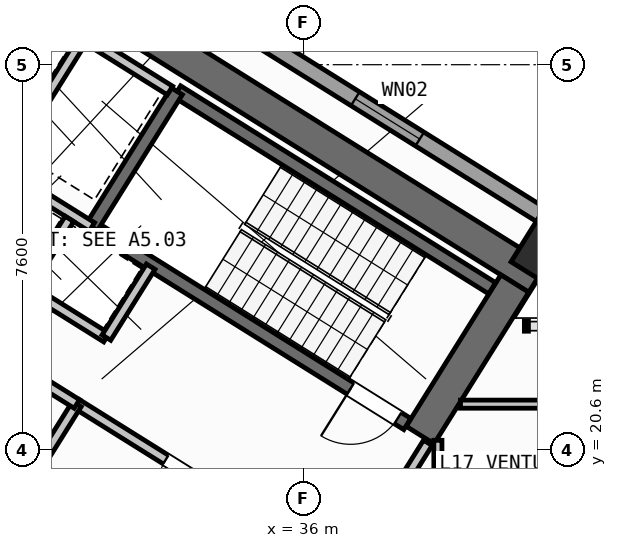
"""IFC4 building model, lengths in metres.
Left out: names, types, materials, properties, quantities, classifications, styles, units other than length and angle.
Written with IfcOpenShell. Run it as: python <this file> out.ifc"""

import sys

from ifc_helpers import new_model, si_unit, direction, frame, frame_2d, origin, origin_2d, place, context, subcontext, project, spatial, rectangle, hollow_rectangle, extrude, source, transform, mapped, element, fill, save


model = new_model("IFC4")
c1 = context("Model", 3, precision=1e-05, world=origin(), true_north=direction((0.0, 1.0)))
c2 = subcontext(c1, "Body", "Model", "MODEL_VIEW")
j1 = project(units=[si_unit("LENGTHUNIT", "METRE"), si_unit("PLANEANGLEUNIT", "RADIAN")], contexts=[c1])
p1 = place(None, origin())
s1 = spatial("IfcSite", under=j1, at=p1, CompositionType="ELEMENT")
p2 = place(p1, origin())
s2 = spatial("IfcBuilding", under=s1, at=p2, CompositionType="ELEMENT")
p3 = place(p2, frame((0.0, 0.0, 67.2)))
s3 = spatial("IfcBuildingStorey", under=s2, at=p3, CompositionType="ELEMENT", Elevation=67.2)
p4 = place(p3, frame((40.615, 23.983, 0.0), z_axis=(0.0, 0.0, 1.0), x_axis=(-0.848045953968, 0.529922692436, 0.0)))
e1 = element("IfcWall", 1, at=p4, inside=s3, PredefinedType="SHEAR", context=c2, shape_type="SweptSolid", body=[
    extrude(rectangle(XDim=13.24, YDim=0.65, at=frame_2d((6.62, 0.0))), origin(), (0.0, 0.0, 1.0), 4.22),
])
p5 = place(p3, frame((40.168, 23.88, 0.0), z_axis=(0.0, 0.0, 1.0), x_axis=(-0.529893103397, -0.8480644427, 0.0)))
e2 = element("IfcWall", 2, at=p5, inside=s3, PredefinedType="SHEAR", context=c2, shape_type="SweptSolid", body=[
    extrude(rectangle(XDim=3.525, YDim=0.65, at=frame_2d((1.763, 0.0))), origin(), (0.0, 0.0, 1.0), 4.22),
])
m1 = source(origin(), c2, "Body", "SweptSolid", [
    extrude(hollow_rectangle(XDim=1.0, YDim=1.0, WallThickness=0.04, at=origin_2d()), origin(), (0.0, 0.0, 1.0), 4.5),
])
p6 = place(p3, frame((40.783, 24.469, 0.0), z_axis=(0.0, 0.0, 1.0), x_axis=(-0.848048096156, 0.529919264233, 0.0)))
e3 = element("IfcColumn", 3, at=p6, inside=s3, PredefinedType="COLUMN", context=c2, shape_type="MappedRepresentation", body=[
    mapped(m1, transform((0.0, 0.0, 0.0), scale=1.0)),
])
p7 = place(p3, frame((14.138, 41.825, 0.0), z_axis=(0.0, 0.0, 1.0), x_axis=(0.848046498049, -0.529921821731, 0.0)))
e4 = element("IfcWall", 4, at=p7, inside=s3, PredefinedType="STANDARD", context=c2, shape_type="SweptSolid", body=[
    extrude(rectangle(XDim=31.588, YDim=0.32, at=frame_2d((15.794, 0.0))), origin(), (0.0, 0.0, 1.0), 4.22),
])
p8 = place(p7, frame((2.526, 0.0, 0.0)))
e5 = element("IfcOpeningElement", 5, at=p8, cuts=e4, PredefinedType="OPENING", context=c2, shape_type="SweptSolid", body=[
    extrude(rectangle(XDim=1.05, YDim=2.15, at=frame_2d((0.525, 1.075))), frame((0.0, 0.17, 0.0), z_axis=(0.0, -1.0, 0.0), x_axis=(1.0, 0.0, 0.0)), (0.0, 0.0, 1.0), 0.34),
])
p9 = place(p7, frame((9.364, 0.0, 0.95)))
e6 = element("IfcOpeningElement", 6, at=p9, cuts=e4, PredefinedType="OPENING", context=c2, shape_type="SweptSolid", body=[
    extrude(rectangle(XDim=1.2, YDim=1.4, at=frame_2d((0.6, 0.7))), frame((0.0, 0.17, 0.0), z_axis=(0.0, -1.0, 0.0), x_axis=(1.0, 0.0, 0.0)), (0.0, 0.0, 1.0), 0.34),
])
p10 = place(p7, frame((14.636, 0.0, 1.0)))
e7 = element("IfcOpeningElement", 7, at=p10, cuts=e4, PredefinedType="OPENING", context=c2, shape_type="SweptSolid", body=[
    extrude(rectangle(XDim=0.9, YDim=1.25, at=frame_2d((0.45, 0.625))), frame((0.0, 0.17, 0.0), z_axis=(0.0, -1.0, 0.0), x_axis=(1.0, 0.0, 0.0)), (0.0, 0.0, 1.0), 0.34),
])
p11 = place(p7, frame((22.306, 0.0, 0.85)))
e8 = element("IfcOpeningElement", 8, at=p11, cuts=e4, PredefinedType="OPENING", context=c2, shape_type="SweptSolid", body=[
    extrude(rectangle(XDim=1.5, YDim=1.5, at=frame_2d((0.75, 0.75))), frame((0.0, 0.17, 0.0), z_axis=(0.0, -1.0, 0.0), x_axis=(1.0, 0.0, 0.0)), (0.0, 0.0, 1.0), 0.34),
])
p12 = place(p7, frame((26.981, 0.0, 0.85)))
e9 = element("IfcOpeningElement", 9, at=p12, cuts=e4, PredefinedType="OPENING", context=c2, shape_type="SweptSolid", body=[
    extrude(rectangle(XDim=1.5, YDim=1.5, at=frame_2d((0.75, 0.75))), frame((0.0, 0.17, 0.0), z_axis=(0.0, -1.0, 0.0), x_axis=(1.0, 0.0, 0.0)), (0.0, 0.0, 1.0), 0.34),
])
p13 = place(p3, frame((31.28, 18.261, 0.0), z_axis=(0.0, 0.0, 1.0), x_axis=(-0.848051618787, 0.529913626805, 0.0)))
e10 = element("IfcWall", 10, at=p13, inside=s3, PredefinedType="SHEAR", context=c2, shape_type="SweptSolid", body=[
    extrude(rectangle(XDim=7.46, YDim=0.26, at=frame_2d((3.73, 0.0))), origin(), (0.0, 0.0, 1.0), 4.22),
])
p14 = place(p13, frame((0.36, 0.0, 0.0)))
e11 = element("IfcOpeningElement", 11, at=p14, cuts=e10, PredefinedType="OPENING", context=c2, shape_type="SweptSolid", body=[
    extrude(rectangle(XDim=0.86, YDim=2.05, at=frame_2d((0.43, 1.025))), frame((0.0, 0.14, 0.0), z_axis=(0.0, -1.0, 0.0), x_axis=(1.0, 0.0, 0.0)), (0.0, 0.0, 1.0), 0.28),
])
p15 = place(p3, frame((39.721, 23.788, 0.0), z_axis=(0.0, 0.0, 1.0), x_axis=(-0.848054434086, 0.529909121291, 0.0)))
e12 = element("IfcWall", 12, at=p15, inside=s3, PredefinedType="SHEAR", context=c2, shape_type="SweptSolid", body=[
    extrude(rectangle(XDim=7.33, YDim=0.26, at=frame_2d((3.665, 0.0))), origin(), (0.0, 0.0, 1.0), 4.22),
])
p16 = place(p3, frame((38.046, 21.108, 0.0), z_axis=(0.0, 0.0, 1.0), x_axis=(-0.848054434086, 0.529909121291, 0.0)))
e13 = element("IfcWall", 13, at=p16, inside=s3, PredefinedType="SHEAR", context=c2, shape_type="SweptSolid", body=[
    extrude(rectangle(XDim=7.33, YDim=0.26, at=frame_2d((3.665, 0.0))), origin(), (0.0, 0.0, 1.0), 4.22),
])
p17 = place(p16, frame((0.22, 0.0, 0.0)))
e14 = element("IfcOpeningElement", 14, at=p17, cuts=e13, PredefinedType="OPENING", context=c2, shape_type="SweptSolid", body=[
    extrude(rectangle(XDim=1.1, YDim=2.1, at=frame_2d((0.55, 1.05))), frame((0.0, 0.14, 0.0), z_axis=(0.0, -1.0, 0.0), x_axis=(1.0, 0.0, 0.0)), (0.0, 0.0, 1.0), 0.28),
])
p18 = place(p3, frame((33.496, 27.677, 0.0), z_axis=(0.0, 0.0, 1.0), x_axis=(-0.529908658664, -0.84805472316, 0.0)))
e15 = element("IfcWall", 15, at=p18, inside=s3, PredefinedType="SHEAR", context=c2, shape_type="SweptSolid", body=[
    extrude(rectangle(XDim=3.16, YDim=0.26, at=frame_2d((1.58, 0.0))), origin(), (0.0, 0.0, 1.0), 4.22),
])
p19 = place(p3, frame((36.374, 18.474, 0.0), z_axis=(0.0, 0.0, 1.0), x_axis=(-0.848051071577, 0.529914502535, 0.0)))
e16 = element("IfcWall", 16, at=p19, inside=s3, PredefinedType="STANDARD", context=c2, shape_type="SweptSolid", body=[
    extrude(rectangle(XDim=5.718, YDim=0.2, at=frame_2d((2.859, 0.0))), origin(), (0.0, 0.0, 1.0), 4.21),
])
p20 = place(p19, frame((2.498, 0.0, 0.0)))
e17 = element("IfcOpeningElement", 17, at=p20, cuts=e16, PredefinedType="OPENING", context=c2, shape_type="SweptSolid", body=[
    extrude(rectangle(XDim=1.15, YDim=2.1, at=frame_2d((0.575, 1.05))), frame((0.0, 0.11, 0.0), z_axis=(0.0, -1.0, 0.0), x_axis=(1.0, 0.0, 0.0)), (0.0, 0.0, 1.0), 0.22),
])
p21 = place(p3, frame((31.822, 24.998, 0.0), z_axis=(0.0, 0.0, 1.0), x_axis=(-0.848058348634, 0.529902856485, 0.0)))
e18 = element("IfcWall", 18, at=p21, inside=s3, PredefinedType="STANDARD", context=c2, shape_type="SweptSolid", body=[
    extrude(rectangle(XDim=4.568, YDim=0.2, at=frame_2d((2.284, 0.0))), origin(), (0.0, 0.0, 1.0), 4.21),
])
p22 = place(p3, frame((32.108, 22.814, 0.0), z_axis=(0.0, 0.0, 1.0), x_axis=(-0.848042229521, 0.529928652696, 0.0)))
e19 = element("IfcWall", 19, at=p22, inside=s3, PredefinedType="STANDARD", context=c2, shape_type="SweptSolid", body=[
    extrude(rectangle(XDim=5.62, YDim=0.2, at=frame_2d((2.81, 0.0))), origin(), (0.0, 0.0, 1.0), 4.21),
])
p23 = place(p3, frame((32.982, 24.213, 0.0), z_axis=(0.0, 0.0, 1.0), x_axis=(-0.529839334948, -0.84809803628, 0.0)))
e20 = element("IfcWall", 20, at=p23, inside=s3, PredefinedType="STANDARD", context=c2, shape_type="SweptSolid", body=[
    extrude(rectangle(XDim=1.65, YDim=0.2, at=frame_2d((0.825, 0.0))), origin(), (0.0, 0.0, 1.0), 4.21),
])
p24 = place(p3, frame((31.645, 28.716, 0.0), z_axis=(0.0, 0.0, 1.0), x_axis=(-0.52986693015, -0.848080795876, 0.0)))
e21 = element("IfcWall", 21, at=p24, inside=s3, PredefinedType="STANDARD", context=c2, shape_type="SweptSolid", body=[
    extrude(rectangle(XDim=2.66, YDim=0.2, at=frame_2d((1.33, 0.0))), origin(), (0.0, 0.0, 1.0), 4.21),
])
p25 = place(p3, frame((33.363, 27.69, 0.0), z_axis=(0.0, 0.0, 1.0), x_axis=(-0.848053806312, 0.529910125964, 0.0)))
e22 = element("IfcWall", 22, at=p25, inside=s3, PredefinedType="STANDARD", context=c2, shape_type="SweptSolid", body=[
    extrude(rectangle(XDim=4.448, YDim=0.2, at=frame_2d((2.224, 0.0))), origin(), (0.0, 0.0, 1.0), 4.21),
])
p26 = place(p3, frame((31.379, 25.156, 0.0), z_axis=(0.0, 0.0, 1.0), x_axis=(-0.529998940003, -0.847998304005, 0.0)))
e23 = element("IfcWall", 23, at=p26, inside=s3, PredefinedType="STANDARD", context=c2, shape_type="SweptSolid", body=[
    extrude(rectangle(XDim=1.58, YDim=0.2, at=frame_2d((0.79, 0.0))), origin(), (0.0, 0.0, 1.0), 4.21),
])
p27 = place(p3, frame((31.525, 21.504, 0.0), z_axis=(0.0, 0.0, 1.0), x_axis=(-0.529907497854, -0.848055448493, 0.0)))
e24 = element("IfcWall", 24, at=p27, inside=s3, PredefinedType="STANDARD", context=c2, shape_type="SweptSolid", body=[
    extrude(rectangle(XDim=2.88, YDim=0.2, at=frame_2d((1.44, 0.0))), origin(), (0.0, 0.0, 1.0), 4.21),
])
p28 = place(p3, frame((31.525, 21.504, 0.0), z_axis=(0.0, 0.0, 1.0), x_axis=(-0.848044998614, 0.529924221305, 0.0)))
e25 = element("IfcWall", 25, at=p28, inside=s3, PredefinedType="STANDARD", context=c2, shape_type="SweptSolid", body=[
    extrude(rectangle(XDim=6.168, YDim=0.2, at=frame_2d((3.084, 0.0))), origin(), (0.0, 0.0, 1.0), 4.21),
])
p29 = place(p28, frame((4.4, 0.0, 0.0)))
e26 = element("IfcOpeningElement", 26, at=p29, cuts=e25, PredefinedType="OPENING", context=c2, shape_type="SweptSolid", body=[
    extrude(rectangle(XDim=0.86, YDim=2.05, at=frame_2d((0.43, 1.025))), frame((0.0, 0.11, 0.0), z_axis=(0.0, -1.0, 0.0), x_axis=(1.0, 0.0, 0.0)), (0.0, 0.0, 1.0), 0.22),
])
p30 = place(p28, frame((1.45, 0.0, 0.0)))
e27 = element("IfcOpeningElement", 27, at=p30, cuts=e25, PredefinedType="OPENING", context=c2, shape_type="SweptSolid", body=[
    extrude(rectangle(XDim=0.86, YDim=2.05, at=frame_2d((0.43, 1.025))), frame((0.0, 0.11, 0.0), z_axis=(0.0, -1.0, 0.0), x_axis=(1.0, 0.0, 0.0)), (0.0, 0.0, 1.0), 0.22),
])
p31 = place(p3, frame((38.451, 20.737, 0.0), z_axis=(0.0, 0.0, 1.0), x_axis=(-0.529924799939, -0.848044637038, 0.0)))
e28 = element("IfcWall", 28, at=p31, inside=s3, PredefinedType="STANDARD", context=c2, shape_type="SweptSolid", body=[
    extrude(rectangle(XDim=2.96, YDim=0.2, at=frame_2d((1.48, 0.0))), origin(), (0.0, 0.0, 1.0), 2.395),
])
p32 = place(p31, frame((1.46, 0.0, 0.0)))
e29 = element("IfcOpeningElement", 29, at=p32, cuts=e28, PredefinedType="OPENING", context=c2, shape_type="SweptSolid", body=[
    extrude(rectangle(XDim=0.86, YDim=2.05, at=frame_2d((0.43, 1.025))), frame((0.0, 0.11, 0.0), z_axis=(0.0, -1.0, 0.0), x_axis=(1.0, 0.0, 0.0)), (0.0, 0.0, 1.0), 0.22),
])
p33 = place(p3, frame((38.65, 17.93, 0.0), z_axis=(0.0, 0.0, 1.0), x_axis=(0.0, 1.0, 0.0)))
e30 = element("IfcWall", 30, at=p33, inside=s3, PredefinedType="PARTITIONING", context=c2, shape_type="SweptSolid", body=[
    extrude(rectangle(XDim=2.857, YDim=0.16, at=frame_2d((1.428, 0.0))), origin(), (0.0, 0.0, 1.0), 4.21),
])
p34 = place(p3, frame((39.095, 21.5, 0.0), z_axis=(0.0, 0.0, 1.0), x_axis=(1.0, 0.0, 0.0)))
e31 = element("IfcWall", 31, at=p34, inside=s3, PredefinedType="PARTITIONING", context=c2, shape_type="SweptSolid", body=[
    extrude(rectangle(XDim=7.094, YDim=0.16, at=frame_2d((3.547, 0.0))), origin(), (0.0, 0.0, 1.0), 4.21),
])
m2 = source(origin(), c2, "Body", "SweptSolid", [
    extrude(rectangle(XDim=1.5, YDim=1.5, at=frame_2d((0.75, 0.75))), frame((0.0, 0.03, 0.0), z_axis=(0.0, -1.0, 0.0), x_axis=(1.0, 0.0, 0.0)), (0.0, 0.0, 1.0), 0.06),
])
p35 = place(p12, origin())
e32 = element("IfcWindow", 32, at=p35, inside=s3, PartitioningType="SINGLE_PANEL", PredefinedType="WINDOW", context=c2, shape_type="MappedRepresentation", body=[
    mapped(m2, transform((0.0, 0.0, 0.0), scale=1.0)),
])
fill(e9, e32)
m3 = source(origin(), c2, "Body", "SweptSolid", [
    extrude(rectangle(XDim=1.1, YDim=2.1, at=frame_2d((0.55, 1.05))), frame((0.0, 0.025, 0.0), z_axis=(0.0, -1.0, 0.0), x_axis=(1.0, 0.0, 0.0)), (0.0, 0.0, 1.0), 0.05),
])
p36 = place(p17, origin())
e33 = element("IfcDoor", 33, at=p36, inside=s3, OperationType="SINGLE_SWING_RIGHT", PredefinedType="DOOR", context=c2, shape_type="MappedRepresentation", body=[
    mapped(m3, transform((0.0, 0.0, 0.0), scale=1.0)),
])
fill(e14, e33)
m4 = source(origin(), c2, "Body", "SweptSolid", [
    extrude(rectangle(XDim=1.15, YDim=2.1, at=frame_2d((0.575, 1.05))), frame((0.0, 0.025, 0.0), z_axis=(0.0, -1.0, 0.0), x_axis=(1.0, 0.0, 0.0)), (0.0, 0.0, 1.0), 0.05),
])
p37 = place(p20, origin())
e34 = element("IfcDoor", 34, at=p37, inside=s3, OperationType="SINGLE_SWING_LEFT", PredefinedType="DOOR", context=c2, shape_type="MappedRepresentation", body=[
    mapped(m4, transform((0.0, 0.0, 0.0), scale=1.0)),
])
fill(e17, e34)
save(model, sys.argv[1])
